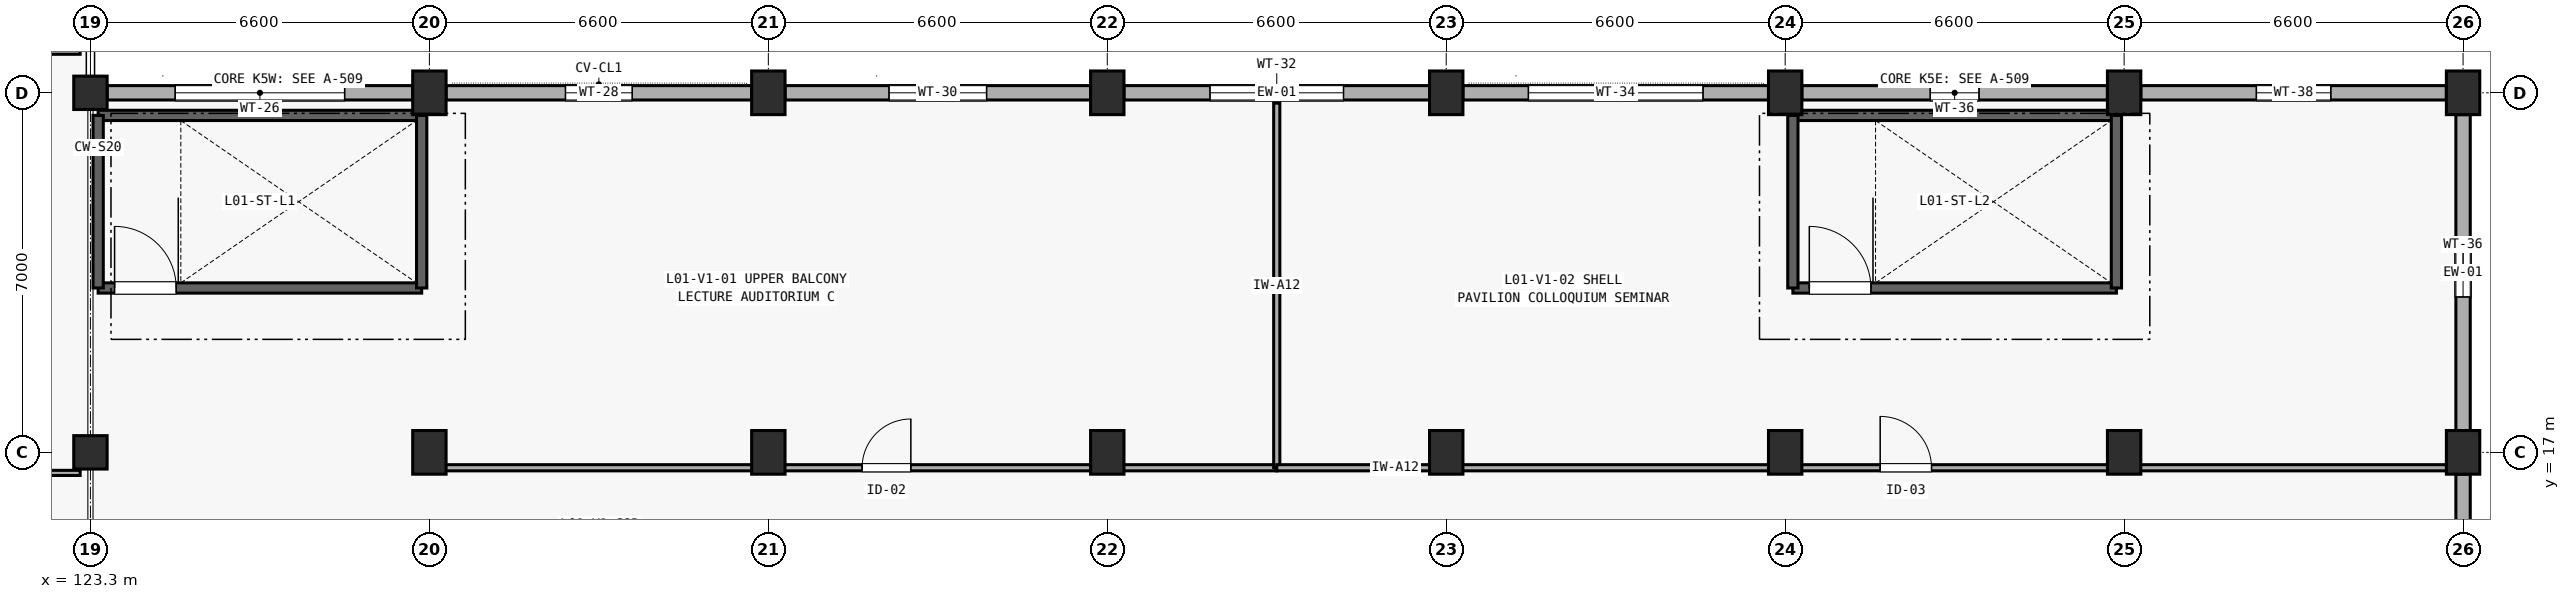
"""IFC4 building model, lengths in metres.
Left out: names, types, materials, properties, quantities, classifications, styles, units other than length and angle.
Written with IfcOpenShell. Run it as: python <this file> out.ifc"""

import sys

from ifc_helpers import new_model, si_unit, direction, frame, frame_2d, origin, origin_2d, place, context, subcontext, project, spatial, rectangle, extrude, element, fill, save


model = new_model("IFC4")
c1 = context("Model", 3, precision=1e-05, world=origin(), true_north=direction((0.0, 1.0)))
c2 = subcontext(c1, "Body", "Model", "MODEL_VIEW")
j1 = project(units=[si_unit("LENGTHUNIT", "METRE"), si_unit("PLANEANGLEUNIT", "RADIAN")], contexts=[c1])
p1 = place(None, origin())
s1 = spatial("IfcSite", under=j1, at=p1, CompositionType="ELEMENT")
p2 = place(p1, origin())
s2 = spatial("IfcBuilding", under=s1, at=p2, CompositionType="ELEMENT")
p3 = place(p2, frame((0.0, 0.0, 4.2)))
s3 = spatial("IfcBuildingStorey", under=s2, at=p3, CompositionType="ELEMENT", Elevation=4.2)
for number, where, z_axis, x_axis in (
    (1, (123.3, 17.0, 0.0), (0.0, 0.0, 1.0), (1.0, 0.0, 0.0)),
    (2, (123.3, 24.0, 0.0), (0.0, 0.0, 1.0), (1.0, 0.0, 0.0)),
):
    element("IfcColumn", number, at=place(p3, frame(where, z_axis=z_axis, x_axis=x_axis)), inside=s3, PredefinedType="COLUMN", context=c2, shape_type="SweptSolid", body=[
        extrude(rectangle(XDim=0.65, YDim=0.65, at=origin_2d()), origin(), (0.0, 0.0, 1.0), 4.2),
    ])
for number, where, z_axis, x_axis in (
    (3, (129.9, 17.0, 0.0), (0.0, 0.0, 1.0), (1.0, 0.0, 0.0)),
    (4, (129.9, 24.0, 0.0), (0.0, 0.0, 1.0), (1.0, 0.0, 0.0)),
    (5, (136.5, 17.0, 0.0), (0.0, 0.0, 1.0), (1.0, 0.0, 0.0)),
    (6, (136.5, 24.0, 0.0), (0.0, 0.0, 1.0), (1.0, 0.0, 0.0)),
    (7, (143.1, 17.0, 0.0), (0.0, 0.0, 1.0), (1.0, 0.0, 0.0)),
    (8, (143.1, 24.0, 0.0), (0.0, 0.0, 1.0), (1.0, 0.0, 0.0)),
    (9, (149.7, 17.0, 0.0), (0.0, 0.0, 1.0), (1.0, 0.0, 0.0)),
    (10, (149.7, 24.0, 0.0), (0.0, 0.0, 1.0), (1.0, 0.0, 0.0)),
    (11, (156.3, 17.0, 0.0), (0.0, 0.0, 1.0), (1.0, 0.0, 0.0)),
    (12, (156.3, 24.0, 0.0), (0.0, 0.0, 1.0), (1.0, 0.0, 0.0)),
    (13, (162.9, 17.0, 0.0), (0.0, 0.0, 1.0), (1.0, 0.0, 0.0)),
    (14, (162.9, 24.0, 0.0), (0.0, 0.0, 1.0), (1.0, 0.0, 0.0)),
    (15, (169.5, 17.0, 0.0), (0.0, 0.0, 1.0), (1.0, 0.0, 0.0)),
    (16, (169.5, 24.0, 0.0), (0.0, 0.0, 1.0), (1.0, 0.0, 0.0)),
):
    element("IfcColumn", number, at=place(p3, frame(where, z_axis=z_axis, x_axis=x_axis)), inside=s3, PredefinedType="COLUMN", context=c2, shape_type="SweptSolid", body=[
        extrude(rectangle(XDim=0.65, YDim=0.85, at=origin_2d()), origin(), (0.0, 0.0, 1.0), 4.2),
    ])
p4 = place(p3, frame((123.625, 24.0, 0.0), z_axis=(0.0, 0.0, 1.0), x_axis=(1.0, 0.0, 0.0)))
e17 = element("IfcWall", 17, at=p4, inside=s3, PredefinedType="SOLIDWALL", context=c2, shape_type="SweptSolid", body=[
    extrude(rectangle(XDim=5.95, YDim=0.28, at=frame_2d((2.975, 0.0))), origin(), (0.0, 0.0, 1.0), 3.285),
])
p5 = place(p4, frame((1.325, 0.0, 0.85)))
e18 = element("IfcOpeningElement", 18, at=p5, cuts=e17, PredefinedType="OPENING", context=c2, shape_type="SweptSolid", body=[
    extrude(rectangle(XDim=3.3, YDim=1.6, at=frame_2d((1.65, 0.8))), frame((0.0, 0.15, 0.0), z_axis=(0.0, -1.0, 0.0), x_axis=(1.0, 0.0, 0.0)), (0.0, 0.0, 1.0), 0.3),
])
p6 = place(p3, frame((130.225, 24.0, 0.0), z_axis=(0.0, 0.0, 1.0), x_axis=(1.0, 0.0, 0.0)))
e19 = element("IfcWall", 19, at=p6, inside=s3, PredefinedType="SOLIDWALL", context=c2, shape_type="SweptSolid", body=[
    extrude(rectangle(XDim=5.95, YDim=0.28, at=frame_2d((2.975, 0.0))), origin(), (0.0, 0.0, 1.0), 3.285),
])
p7 = place(p6, frame((2.325, 0.0, 0.85)))
e20 = element("IfcOpeningElement", 20, at=p7, cuts=e19, PredefinedType="OPENING", context=c2, shape_type="SweptSolid", body=[
    extrude(rectangle(XDim=1.3, YDim=1.45, at=frame_2d((0.65, 0.725))), frame((0.0, 0.15, 0.0), z_axis=(0.0, -1.0, 0.0), x_axis=(1.0, 0.0, 0.0)), (0.0, 0.0, 1.0), 0.3),
])
p8 = place(p3, frame((136.825, 24.0, 0.0), z_axis=(0.0, 0.0, 1.0), x_axis=(1.0, 0.0, 0.0)))
e21 = element("IfcWall", 21, at=p8, inside=s3, PredefinedType="SOLIDWALL", context=c2, shape_type="SweptSolid", body=[
    extrude(rectangle(XDim=5.95, YDim=0.28, at=frame_2d((2.975, 0.0))), origin(), (0.0, 0.0, 1.0), 3.285),
])
p9 = place(p8, frame((2.025, 0.0, 0.85)))
e22 = element("IfcOpeningElement", 22, at=p9, cuts=e21, PredefinedType="OPENING", context=c2, shape_type="SweptSolid", body=[
    extrude(rectangle(XDim=1.9, YDim=1.45, at=frame_2d((0.95, 0.725))), frame((0.0, 0.15, 0.0), z_axis=(0.0, -1.0, 0.0), x_axis=(1.0, 0.0, 0.0)), (0.0, 0.0, 1.0), 0.3),
])
p10 = place(p3, frame((143.425, 24.0, 0.0), z_axis=(0.0, 0.0, 1.0), x_axis=(1.0, 0.0, 0.0)))
e23 = element("IfcWall", 23, at=p10, inside=s3, PredefinedType="SOLIDWALL", context=c2, shape_type="SweptSolid", body=[
    extrude(rectangle(XDim=5.95, YDim=0.28, at=frame_2d((2.975, 0.0))), origin(), (0.0, 0.0, 1.0), 3.285),
])
p11 = place(p10, frame((1.675, 0.0, 0.85)))
e24 = element("IfcOpeningElement", 24, at=p11, cuts=e23, PredefinedType="OPENING", context=c2, shape_type="SweptSolid", body=[
    extrude(rectangle(XDim=2.6, YDim=1.2, at=frame_2d((1.3, 0.6))), frame((0.0, 0.15, 0.0), z_axis=(0.0, -1.0, 0.0), x_axis=(1.0, 0.0, 0.0)), (0.0, 0.0, 1.0), 0.3),
])
p12 = place(p3, frame((150.025, 24.0, 0.0), z_axis=(0.0, 0.0, 1.0), x_axis=(1.0, 0.0, 0.0)))
e25 = element("IfcWall", 25, at=p12, inside=s3, PredefinedType="SOLIDWALL", context=c2, shape_type="SweptSolid", body=[
    extrude(rectangle(XDim=5.95, YDim=0.28, at=frame_2d((2.975, 0.0))), origin(), (0.0, 0.0, 1.0), 3.285),
])
p13 = place(p12, frame((1.275, 0.0, 0.85)))
e26 = element("IfcOpeningElement", 26, at=p13, cuts=e25, PredefinedType="OPENING", context=c2, shape_type="SweptSolid", body=[
    extrude(rectangle(XDim=3.4, YDim=1.2, at=frame_2d((1.7, 0.6))), frame((0.0, 0.15, 0.0), z_axis=(0.0, -1.0, 0.0), x_axis=(1.0, 0.0, 0.0)), (0.0, 0.0, 1.0), 0.3),
])
p14 = place(p3, frame((156.625, 24.0, 0.0), z_axis=(0.0, 0.0, 1.0), x_axis=(1.0, 0.0, 0.0)))
e27 = element("IfcWall", 27, at=p14, inside=s3, PredefinedType="SOLIDWALL", context=c2, shape_type="SweptSolid", body=[
    extrude(rectangle(XDim=5.95, YDim=0.28, at=frame_2d((2.975, 0.0))), origin(), (0.0, 0.0, 1.0), 3.285),
])
p15 = place(p14, frame((2.5, 0.0, 0.85)))
e28 = element("IfcOpeningElement", 28, at=p15, cuts=e27, PredefinedType="OPENING", context=c2, shape_type="SweptSolid", body=[
    extrude(rectangle(XDim=0.95, YDim=1.55, at=frame_2d((0.475, 0.775))), frame((0.0, 0.15, 0.0), z_axis=(0.0, -1.0, 0.0), x_axis=(1.0, 0.0, 0.0)), (0.0, 0.0, 1.0), 0.3),
])
p16 = place(p3, frame((163.225, 24.0, 0.0), z_axis=(0.0, 0.0, 1.0), x_axis=(1.0, 0.0, 0.0)))
e29 = element("IfcWall", 29, at=p16, inside=s3, PredefinedType="SOLIDWALL", context=c2, shape_type="SweptSolid", body=[
    extrude(rectangle(XDim=5.95, YDim=0.28, at=frame_2d((2.975, 0.0))), origin(), (0.0, 0.0, 1.0), 3.285),
])
p17 = place(p16, frame((2.25, 0.0, 0.85)))
e30 = element("IfcOpeningElement", 30, at=p17, cuts=e29, PredefinedType="OPENING", context=c2, shape_type="SweptSolid", body=[
    extrude(rectangle(XDim=1.45, YDim=1.55, at=frame_2d((0.725, 0.775))), frame((0.0, 0.15, 0.0), z_axis=(0.0, -1.0, 0.0), x_axis=(1.0, 0.0, 0.0)), (0.0, 0.0, 1.0), 0.3),
])
p18 = place(p3, frame((169.5, 10.425, 0.0), z_axis=(0.0, 0.0, 1.0), x_axis=(0.0, 1.0, 0.0)))
e31 = element("IfcWall", 31, at=p18, inside=s3, PredefinedType="SOLIDWALL", context=c2, shape_type="SweptSolid", body=[
    extrude(rectangle(XDim=6.15, YDim=0.28, at=frame_2d((3.075, 0.0))), origin(), (0.0, 0.0, 1.0), 3.85),
])
p19 = place(p18, frame((1.375, 0.0, 0.85)))
e32 = element("IfcOpeningElement", 32, at=p19, cuts=e31, PredefinedType="OPENING", context=c2, shape_type="SweptSolid", body=[
    extrude(rectangle(XDim=3.4, YDim=1.2, at=frame_2d((1.7, 0.6))), frame((0.0, 0.15, 0.0), z_axis=(0.0, -1.0, 0.0), x_axis=(1.0, 0.0, 0.0)), (0.0, 0.0, 1.0), 0.3),
])
p20 = place(p3, frame((169.5, 17.425, 0.0), z_axis=(0.0, 0.0, 1.0), x_axis=(0.0, 1.0, 0.0)))
e33 = element("IfcWall", 33, at=p20, inside=s3, PredefinedType="SOLIDWALL", context=c2, shape_type="SweptSolid", body=[
    extrude(rectangle(XDim=6.15, YDim=0.28, at=frame_2d((3.075, 0.0))), origin(), (0.0, 0.0, 1.0), 3.85),
])
p21 = place(p20, frame((2.6, 0.0, 0.85)))
e34 = element("IfcOpeningElement", 34, at=p21, cuts=e33, PredefinedType="OPENING", context=c2, shape_type="SweptSolid", body=[
    extrude(rectangle(XDim=0.95, YDim=1.55, at=frame_2d((0.475, 0.775))), frame((0.0, 0.15, 0.0), z_axis=(0.0, -1.0, 0.0), x_axis=(1.0, 0.0, 0.0)), (0.0, 0.0, 1.0), 0.3),
])
p22 = place(p3, frame((123.45, 20.2, 0.0), z_axis=(0.0, 0.0, 1.0), x_axis=(1.0, 0.0, 0.0)))
e35 = element("IfcWall", 35, at=p22, inside=s3, PredefinedType="SHEAR", context=c2, shape_type="SweptSolid", body=[
    extrude(rectangle(XDim=6.3, YDim=0.2, at=frame_2d((3.15, 0.0))), origin(), (0.0, 0.0, 1.0), 4.2),
])
p23 = place(p22, frame((0.32, 0.0, 0.0)))
e36 = element("IfcOpeningElement", 36, at=p23, cuts=e35, PredefinedType="OPENING", context=c2, shape_type="SweptSolid", body=[
    extrude(rectangle(XDim=1.2, YDim=2.15, at=frame_2d((0.6, 1.075))), frame((0.0, 0.11, 0.0), z_axis=(0.0, -1.0, 0.0), x_axis=(1.0, 0.0, 0.0)), (0.0, 0.0, 1.0), 0.22),
])
p24 = place(p3, frame((123.45, 23.56, 0.0), z_axis=(0.0, 0.0, 1.0), x_axis=(1.0, 0.0, 0.0)))
e37 = element("IfcWall", 37, at=p24, inside=s3, PredefinedType="SHEAR", context=c2, shape_type="SweptSolid", body=[
    extrude(rectangle(XDim=6.3, YDim=0.2, at=frame_2d((3.15, 0.0))), origin(), (0.0, 0.0, 1.0), 4.2),
])
for number, where, z_axis, x_axis in (
    (38, (123.45, 20.2, 0.0), (0.0, 0.0, 1.0), (0.0, 1.0, 0.0)),
    (39, (129.75, 20.2, 0.0), (0.0, 0.0, 1.0), (0.0, 1.0, 0.0)),
):
    element("IfcWall", number, at=place(p3, frame(where, z_axis=z_axis, x_axis=x_axis)), inside=s3, PredefinedType="SHEAR", context=c2, shape_type="SweptSolid", body=[
        extrude(rectangle(XDim=3.36, YDim=0.2, at=frame_2d((1.68, 0.0))), origin(), (0.0, 0.0, 1.0), 4.2),
    ])
p25 = place(p3, frame((156.45, 20.2, 0.0), z_axis=(0.0, 0.0, 1.0), x_axis=(1.0, 0.0, 0.0)))
e40 = element("IfcWall", 40, at=p25, inside=s3, PredefinedType="SHEAR", context=c2, shape_type="SweptSolid", body=[
    extrude(rectangle(XDim=6.3, YDim=0.2, at=frame_2d((3.15, 0.0))), origin(), (0.0, 0.0, 1.0), 4.2),
])
p26 = place(p25, frame((0.32, 0.0, 0.0)))
e41 = element("IfcOpeningElement", 41, at=p26, cuts=e40, PredefinedType="OPENING", context=c2, shape_type="SweptSolid", body=[
    extrude(rectangle(XDim=1.2, YDim=2.15, at=frame_2d((0.6, 1.075))), frame((0.0, 0.11, 0.0), z_axis=(0.0, -1.0, 0.0), x_axis=(1.0, 0.0, 0.0)), (0.0, 0.0, 1.0), 0.22),
])
p27 = place(p3, frame((156.45, 23.56, 0.0), z_axis=(0.0, 0.0, 1.0), x_axis=(1.0, 0.0, 0.0)))
e42 = element("IfcWall", 42, at=p27, inside=s3, PredefinedType="SHEAR", context=c2, shape_type="SweptSolid", body=[
    extrude(rectangle(XDim=6.3, YDim=0.2, at=frame_2d((3.15, 0.0))), origin(), (0.0, 0.0, 1.0), 4.2),
])
for number, where, z_axis, x_axis in (
    (43, (156.45, 20.2, 0.0), (0.0, 0.0, 1.0), (0.0, 1.0, 0.0)),
    (44, (162.75, 20.2, 0.0), (0.0, 0.0, 1.0), (0.0, 1.0, 0.0)),
):
    element("IfcWall", number, at=place(p3, frame(where, z_axis=z_axis, x_axis=x_axis)), inside=s3, PredefinedType="SHEAR", context=c2, shape_type="SweptSolid", body=[
        extrude(rectangle(XDim=3.36, YDim=0.2, at=frame_2d((1.68, 0.0))), origin(), (0.0, 0.0, 1.0), 4.2),
    ])
p28 = place(p3, frame((130.0, 16.7, 0.0), z_axis=(0.0, 0.0, 1.0), x_axis=(1.0, 0.0, 0.0)))
e45 = element("IfcWall", 45, at=p28, inside=s3, PredefinedType="PARTITIONING", context=c2, shape_type="SweptSolid", body=[
    extrude(rectangle(XDim=16.4, YDim=0.12, at=frame_2d((8.2, 0.0))), origin(), (0.0, 0.0, 1.0), 3.9),
])
p29 = place(p28, frame((8.325, 0.0, 0.0)))
e46 = element("IfcOpeningElement", 46, at=p29, cuts=e45, PredefinedType="OPENING", context=c2, shape_type="SweptSolid", body=[
    extrude(rectangle(XDim=0.95, YDim=2.1, at=frame_2d((0.475, 1.05))), frame((0.0, 0.07, 0.0), z_axis=(0.0, -1.0, 0.0), x_axis=(1.0, 0.0, 0.0)), (0.0, 0.0, 1.0), 0.14),
])
p30 = place(p3, frame((146.4, 16.7, 0.0), z_axis=(0.0, 0.0, 1.0), x_axis=(0.0, 1.0, 0.0)))
e47 = element("IfcWall", 47, at=p30, inside=s3, PredefinedType="PARTITIONING", context=c2, shape_type="SweptSolid", body=[
    extrude(rectangle(XDim=7.1, YDim=0.12, at=frame_2d((3.55, 0.0))), origin(), (0.0, 0.0, 1.0), 3.9),
])
p31 = place(p3, frame((146.4, 16.7, 0.0), z_axis=(0.0, 0.0, 1.0), x_axis=(1.0, 0.0, 0.0)))
e48 = element("IfcWall", 48, at=p31, inside=s3, PredefinedType="PARTITIONING", context=c2, shape_type="SweptSolid", body=[
    extrude(rectangle(XDim=22.9, YDim=0.12, at=frame_2d((11.45, 0.0))), origin(), (0.0, 0.0, 1.0), 3.9),
])
p32 = place(p31, frame((11.75, 0.0, 0.0)))
e49 = element("IfcOpeningElement", 49, at=p32, cuts=e48, PredefinedType="OPENING", context=c2, shape_type="SweptSolid", body=[
    extrude(rectangle(XDim=1.0, YDim=2.1, at=frame_2d((0.5, 1.05))), frame((0.0, 0.07, 0.0), z_axis=(0.0, -1.0, 0.0), x_axis=(1.0, 0.0, 0.0)), (0.0, 0.0, 1.0), 0.14),
])
p33 = place(p3, frame((106.5, 16.6, 0.0), z_axis=(0.0, 0.0, 1.0), x_axis=(1.0, 0.0, 0.0)))
e50 = element("IfcWall", 50, at=p33, inside=s3, PredefinedType="PARTITIONING", context=c2, shape_type="SweptSolid", body=[
    extrude(rectangle(XDim=16.6, YDim=0.1, at=frame_2d((8.3, 0.0))), origin(), (0.0, 0.0, 1.0), 3.9),
])
p34 = place(p3, frame((106.5, 24.8, 0.0), z_axis=(0.0, 0.0, 1.0), x_axis=(1.0, 0.0, 0.0)))
e51 = element("IfcWall", 51, at=p34, inside=s3, PredefinedType="PARTITIONING", context=c2, shape_type="SweptSolid", body=[
    extrude(rectangle(XDim=16.6, YDim=0.1, at=frame_2d((8.3, 0.0))), origin(), (0.0, 0.0, 1.0), 3.9),
])
p35 = place(p34, frame((7.425, 0.0, 0.0)))
e52 = element("IfcOpeningElement", 52, at=p35, cuts=e51, PredefinedType="OPENING", context=c2, shape_type="SweptSolid", body=[
    extrude(rectangle(XDim=1.35, YDim=2.2, at=frame_2d((0.675, 1.1))), frame((0.0, 0.06, 0.0), z_axis=(0.0, -1.0, 0.0), x_axis=(1.0, 0.0, 0.0)), (0.0, 0.0, 1.0), 0.12),
])
p36 = place(p5, origin())
e53 = element("IfcWindow", 53, at=p36, inside=s3, PartitioningType="SINGLE_PANEL", PredefinedType="WINDOW", context=c2, shape_type="SweptSolid", body=[
    extrude(rectangle(XDim=3.3, YDim=1.6, at=frame_2d((1.65, 0.8))), frame((0.0, 0.03, 0.0), z_axis=(0.0, -1.0, 0.0), x_axis=(1.0, 0.0, 0.0)), (0.0, 0.0, 1.0), 0.06),
])
fill(e18, e53)
p37 = place(p7, origin())
e54 = element("IfcWindow", 54, at=p37, inside=s3, PartitioningType="SINGLE_PANEL", PredefinedType="WINDOW", context=c2, shape_type="SweptSolid", body=[
    extrude(rectangle(XDim=1.3, YDim=1.45, at=frame_2d((0.65, 0.725))), frame((0.0, 0.03, 0.0), z_axis=(0.0, -1.0, 0.0), x_axis=(1.0, 0.0, 0.0)), (0.0, 0.0, 1.0), 0.06),
])
fill(e20, e54)
p38 = place(p9, origin())
e55 = element("IfcWindow", 55, at=p38, inside=s3, PartitioningType="SINGLE_PANEL", PredefinedType="WINDOW", context=c2, shape_type="SweptSolid", body=[
    extrude(rectangle(XDim=1.9, YDim=1.45, at=frame_2d((0.95, 0.725))), frame((0.0, 0.03, 0.0), z_axis=(0.0, -1.0, 0.0), x_axis=(1.0, 0.0, 0.0)), (0.0, 0.0, 1.0), 0.06),
])
fill(e22, e55)
p39 = place(p11, origin())
e56 = element("IfcWindow", 56, at=p39, inside=s3, PartitioningType="SINGLE_PANEL", PredefinedType="WINDOW", context=c2, shape_type="SweptSolid", body=[
    extrude(rectangle(XDim=2.6, YDim=1.2, at=frame_2d((1.3, 0.6))), frame((0.0, 0.03, 0.0), z_axis=(0.0, -1.0, 0.0), x_axis=(1.0, 0.0, 0.0)), (0.0, 0.0, 1.0), 0.06),
])
fill(e24, e56)
p40 = place(p13, origin())
e57 = element("IfcWindow", 57, at=p40, inside=s3, PartitioningType="SINGLE_PANEL", PredefinedType="WINDOW", context=c2, shape_type="SweptSolid", body=[
    extrude(rectangle(XDim=3.4, YDim=1.2, at=frame_2d((1.7, 0.6))), frame((0.0, 0.03, 0.0), z_axis=(0.0, -1.0, 0.0), x_axis=(1.0, 0.0, 0.0)), (0.0, 0.0, 1.0), 0.06),
])
fill(e26, e57)
p41 = place(p15, origin())
e58 = element("IfcWindow", 58, at=p41, inside=s3, PartitioningType="SINGLE_PANEL", PredefinedType="WINDOW", context=c2, shape_type="SweptSolid", body=[
    extrude(rectangle(XDim=0.95, YDim=1.55, at=frame_2d((0.475, 0.775))), frame((0.0, 0.03, 0.0), z_axis=(0.0, -1.0, 0.0), x_axis=(1.0, 0.0, 0.0)), (0.0, 0.0, 1.0), 0.06),
])
fill(e28, e58)
p42 = place(p17, origin())
e59 = element("IfcWindow", 59, at=p42, inside=s3, PartitioningType="SINGLE_PANEL", PredefinedType="WINDOW", context=c2, shape_type="SweptSolid", body=[
    extrude(rectangle(XDim=1.45, YDim=1.55, at=frame_2d((0.725, 0.775))), frame((0.0, 0.03, 0.0), z_axis=(0.0, -1.0, 0.0), x_axis=(1.0, 0.0, 0.0)), (0.0, 0.0, 1.0), 0.06),
])
fill(e30, e59)
p43 = place(p21, origin())
e60 = element("IfcWindow", 60, at=p43, inside=s3, PartitioningType="SINGLE_PANEL", PredefinedType="WINDOW", context=c2, shape_type="SweptSolid", body=[
    extrude(rectangle(XDim=0.95, YDim=1.55, at=frame_2d((0.475, 0.775))), frame((0.0, 0.03, 0.0), z_axis=(0.0, -1.0, 0.0), x_axis=(1.0, 0.0, 0.0)), (0.0, 0.0, 1.0), 0.06),
])
fill(e34, e60)
p44 = place(p23, origin())
e61 = element("IfcDoor", 61, at=p44, inside=s3, OperationType="SINGLE_SWING_LEFT", PredefinedType="DOOR", context=c2, shape_type="SweptSolid", body=[
    extrude(rectangle(XDim=1.2, YDim=2.15, at=frame_2d((0.6, 1.075))), frame((0.0, 0.025, 0.0), z_axis=(0.0, -1.0, 0.0), x_axis=(1.0, 0.0, 0.0)), (0.0, 0.0, 1.0), 0.05),
])
fill(e36, e61)
p45 = place(p26, origin())
e62 = element("IfcDoor", 62, at=p45, inside=s3, OperationType="SINGLE_SWING_LEFT", PredefinedType="DOOR", context=c2, shape_type="SweptSolid", body=[
    extrude(rectangle(XDim=1.2, YDim=2.15, at=frame_2d((0.6, 1.075))), frame((0.0, 0.025, 0.0), z_axis=(0.0, -1.0, 0.0), x_axis=(1.0, 0.0, 0.0)), (0.0, 0.0, 1.0), 0.05),
])
fill(e41, e62)
p46 = place(p29, origin())
e63 = element("IfcDoor", 63, at=p46, inside=s3, OperationType="SINGLE_SWING_RIGHT", PredefinedType="DOOR", context=c2, shape_type="SweptSolid", body=[
    extrude(rectangle(XDim=0.95, YDim=2.1, at=frame_2d((0.475, 1.05))), frame((0.0, 0.025, 0.0), z_axis=(0.0, -1.0, 0.0), x_axis=(1.0, 0.0, 0.0)), (0.0, 0.0, 1.0), 0.05),
])
fill(e46, e63)
p47 = place(p32, origin())
e64 = element("IfcDoor", 64, at=p47, inside=s3, OperationType="SINGLE_SWING_LEFT", PredefinedType="DOOR", context=c2, shape_type="SweptSolid", body=[
    extrude(rectangle(XDim=1.0, YDim=2.1, at=frame_2d((0.5, 1.05))), frame((0.0, 0.025, 0.0), z_axis=(0.0, -1.0, 0.0), x_axis=(1.0, 0.0, 0.0)), (0.0, 0.0, 1.0), 0.05),
])
fill(e49, e64)
save(model, sys.argv[1])
